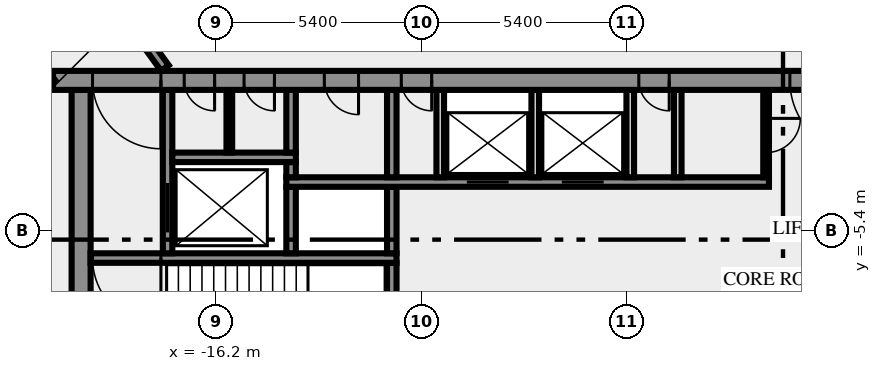
"""IFC4 building model, lengths in metres.
Left out: names, types, materials, properties, quantities, classifications, styles, units other than length and angle.
Written with IfcOpenShell. Run it as: python <this file> out.ifc"""

import sys

from ifc_helpers import new_model, si_unit, direction, frame, frame_2d, origin, place, context, subcontext, project, spatial, rectangle, extrude, element, fill, save


model = new_model("IFC4")
c1 = context("Model", 3, precision=1e-05, world=origin(), true_north=direction((0.0, 1.0)))
c2 = subcontext(c1, "Body", "Model", "MODEL_VIEW")
j1 = project(units=[si_unit("LENGTHUNIT", "METRE"), si_unit("PLANEANGLEUNIT", "RADIAN")], contexts=[c1])
p1 = place(None, origin())
s1 = spatial("IfcSite", under=j1, at=p1, CompositionType="ELEMENT")
p2 = place(p1, origin())
s2 = spatial("IfcBuilding", under=s1, at=p2, CompositionType="ELEMENT")
p3 = place(p2, frame((0.0, 0.0, 269.0)))
s3 = spatial("IfcBuildingStorey", under=s2, at=p3, CompositionType="ELEMENT", Elevation=269.0)
p4 = place(p3, frame((-19.75, -10.5, 0.0), z_axis=(0.0, 0.0, 1.0), x_axis=(0.0, 1.0, 0.0)))
e1 = element("IfcWall", 1, at=p4, inside=s3, PredefinedType="SHEAR", context=c2, shape_type="SweptSolid", body=[
    extrude(rectangle(XDim=8.8, YDim=0.5, at=frame_2d((4.4, 0.0))), origin(), (0.0, 0.0, 1.0), 3.5),
])
p5 = place(p3, frame((-11.575, -7.25, 0.0), z_axis=(0.0, 0.0, 1.0), x_axis=(0.0, 1.0, 0.0)))
e2 = element("IfcWall", 2, at=p5, inside=s3, PredefinedType="SHEAR", context=c2, shape_type="SweptSolid", body=[
    extrude(rectangle(XDim=1.0, YDim=0.25, at=frame_2d((0.5, 0.0))), origin(), (0.0, 0.0, 1.0), 3.5),
])
p6 = place(p3, frame((-11.45, -6.125, 0.0), z_axis=(0.0, 0.0, 1.0), x_axis=(-1.0, 0.0, 0.0)))
e3 = element("IfcWall", 3, at=p6, inside=s3, PredefinedType="SHEAR", context=c2, shape_type="SweptSolid", body=[
    extrude(rectangle(XDim=8.05, YDim=0.25, at=frame_2d((4.025, 0.0))), origin(), (0.0, 0.0, 1.0), 3.5),
])
p7 = place(p6, frame((6.2, 0.0, 0.0)))
e4 = element("IfcOpeningElement", 4, at=p7, cuts=e3, PredefinedType="OPENING", context=c2, shape_type="SweptSolid", body=[
    extrude(rectangle(XDim=1.8, YDim=2.1, at=frame_2d((0.9, 1.05))), frame((0.0, 0.135, 0.0), z_axis=(0.0, -1.0, 0.0), x_axis=(1.0, 0.0, 0.0)), (0.0, 0.0, 1.0), 0.27),
])
p8 = place(p3, frame((-17.475, -6.0, 0.0), z_axis=(0.0, 0.0, 1.0), x_axis=(0.0, 1.0, 0.0)))
e5 = element("IfcWall", 5, at=p8, inside=s3, PredefinedType="SHEAR", context=c2, shape_type="SweptSolid", body=[
    extrude(rectangle(XDim=4.3, YDim=0.25, at=frame_2d((2.15, 0.0))), origin(), (0.0, 0.0, 1.0), 3.5),
])
p9 = place(p8, frame((0.55, 0.0, 0.0)))
e6 = element("IfcOpeningElement", 6, at=p9, cuts=e5, PredefinedType="OPENING", context=c2, shape_type="SweptSolid", body=[
    extrude(rectangle(XDim=1.3, YDim=2.1, at=frame_2d((0.65, 1.05))), frame((0.0, 0.135, 0.0), z_axis=(0.0, -1.0, 0.0), x_axis=(1.0, 0.0, 0.0)), (0.0, 0.0, 1.0), 0.27),
])
for number, where, z_axis, x_axis in (
    (7, (-14.225, -6.0, 0.0), (0.0, 0.0, 1.0), (0.0, 1.0, 0.0)),
    (8, (-11.575, -6.0, 0.0), (0.0, 0.0, 1.0), (0.0, 1.0, 0.0)),
):
    element("IfcWall", number, at=place(p3, frame(where, z_axis=z_axis, x_axis=x_axis)), inside=s3, PredefinedType="SHEAR", context=c2, shape_type="SweptSolid", body=[
        extrude(rectangle(XDim=1.75, YDim=0.25, at=frame_2d((0.875, 0.0))), origin(), (0.0, 0.0, 1.0), 3.5),
    ])
p10 = place(p3, frame((-14.35, -4.125, 0.0), z_axis=(0.0, 0.0, 1.0), x_axis=(1.0, 0.0, 0.0)))
e9 = element("IfcWall", 9, at=p10, inside=s3, PredefinedType="SHEAR", context=c2, shape_type="SweptSolid", body=[
    extrude(rectangle(XDim=12.7, YDim=0.25, at=frame_2d((6.35, 0.0))), origin(), (0.0, 0.0, 1.0), 3.5),
])
p11 = place(p10, frame((4.75, 0.0, 0.0)))
e10 = element("IfcOpeningElement", 10, at=p11, cuts=e9, PredefinedType="OPENING", context=c2, shape_type="SweptSolid", body=[
    extrude(rectangle(XDim=1.1, YDim=2.1, at=frame_2d((0.55, 1.05))), frame((0.0, 0.135, 0.0), z_axis=(0.0, -1.0, 0.0), x_axis=(1.0, 0.0, 0.0)), (0.0, 0.0, 1.0), 0.27),
])
p12 = place(p10, frame((7.25, 0.0, 0.0)))
e11 = element("IfcOpeningElement", 11, at=p12, cuts=e9, PredefinedType="OPENING", context=c2, shape_type="SweptSolid", body=[
    extrude(rectangle(XDim=1.1, YDim=2.1, at=frame_2d((0.55, 1.05))), frame((0.0, 0.135, 0.0), z_axis=(0.0, -1.0, 0.0), x_axis=(1.0, 0.0, 0.0)), (0.0, 0.0, 1.0), 0.27),
])
p13 = place(p3, frame((-14.225, -4.0, 0.0), z_axis=(0.0, 0.0, 1.0), x_axis=(0.0, 1.0, 0.0)))
e12 = element("IfcWall", 12, at=p13, inside=s3, PredefinedType="SHEAR", context=c2, shape_type="SweptSolid", body=[
    extrude(rectangle(XDim=0.4, YDim=0.25, at=frame_2d((0.2, 0.0))), origin(), (0.0, 0.0, 1.0), 3.5),
])
p14 = place(p3, frame((-11.575, -4.0, 0.0), z_axis=(0.0, 0.0, 1.0), x_axis=(0.0, 1.0, 0.0)))
e13 = element("IfcWall", 13, at=p14, inside=s3, PredefinedType="SHEAR", context=c2, shape_type="SweptSolid", body=[
    extrude(rectangle(XDim=2.3, YDim=0.25, at=frame_2d((1.15, 0.0))), origin(), (0.0, 0.0, 1.0), 3.5),
])
for number, where, z_axis, x_axis in (
    (14, (-10.3, -4.0, 0.0), (0.0, 0.0, 1.0), (0.0, 1.0, 0.0)),
    (15, (-7.8, -4.0, 0.0), (0.0, 0.0, 1.0), (0.0, 1.0, 0.0)),
    (16, (-5.3, -4.0, 0.0), (0.0, 0.0, 1.0), (0.0, 1.0, 0.0)),
    (17, (-4.05, -4.0, 0.0), (0.0, 0.0, 1.0), (0.0, 1.0, 0.0)),
):
    element("IfcWall", number, at=place(p3, frame(where, z_axis=z_axis, x_axis=x_axis)), inside=s3, PredefinedType="SOLIDWALL", context=c2, shape_type="SweptSolid", body=[
        extrude(rectangle(XDim=2.3, YDim=0.2, at=frame_2d((1.15, 0.0))), origin(), (0.0, 0.0, 1.0), 3.5),
    ])
p15 = place(p3, frame((-1.725, -1.7, 0.0), z_axis=(0.0, 0.0, 1.0), x_axis=(0.0, -1.0, 0.0)))
e18 = element("IfcWall", 18, at=p15, inside=s3, PredefinedType="PARTITIONING", context=c2, shape_type="SweptSolid", body=[
    extrude(rectangle(XDim=2.3, YDim=0.15, at=frame_2d((1.15, 0.0))), origin(), (0.0, 0.0, 1.0), 3.5),
])
p16 = place(p15, frame((0.75, 0.0, 0.0)))
e19 = element("IfcOpeningElement", 19, at=p16, cuts=e18, PredefinedType="OPENING", context=c2, shape_type="SweptSolid", body=[
    extrude(rectangle(XDim=0.9, YDim=2.1, at=frame_2d((0.45, 1.05))), frame((0.0, 0.085, 0.0), z_axis=(0.0, -1.0, 0.0), x_axis=(1.0, 0.0, 0.0)), (0.0, 0.0, 1.0), 0.17),
])
p17 = place(p3, frame((-17.35, -3.475, 0.0), z_axis=(0.0, 0.0, 1.0), x_axis=(1.0, 0.0, 0.0)))
e20 = element("IfcWall", 20, at=p17, inside=s3, PredefinedType="SHEAR", context=c2, shape_type="SweptSolid", body=[
    extrude(rectangle(XDim=3.25, YDim=0.25, at=frame_2d((1.625, 0.0))), origin(), (0.0, 0.0, 1.0), 3.5),
])
p18 = place(p3, frame((-15.85, -3.35, 0.0), z_axis=(0.0, 0.0, 1.0), x_axis=(0.0, 1.0, 0.0)))
e21 = element("IfcWall", 21, at=p18, inside=s3, PredefinedType="PARTITIONING", context=c2, shape_type="SweptSolid", body=[
    extrude(rectangle(XDim=1.65, YDim=0.15, at=frame_2d((0.825, 0.0))), origin(), (0.0, 0.0, 1.0), 3.5),
])
p19 = place(p3, frame((-14.225, -3.35, 0.0), z_axis=(0.0, 0.0, 1.0), x_axis=(0.0, 1.0, 0.0)))
e22 = element("IfcWall", 22, at=p19, inside=s3, PredefinedType="SHEAR", context=c2, shape_type="SweptSolid", body=[
    extrude(rectangle(XDim=1.65, YDim=0.25, at=frame_2d((0.825, 0.0))), origin(), (0.0, 0.0, 1.0), 3.5),
])
p20 = place(p3, frame((20.49, -1.45, 0.0), z_axis=(0.0, 0.0, 1.0), x_axis=(-1.0, 0.0, 0.0)))
e23 = element("IfcWall", 23, at=p20, inside=s3, PredefinedType="SHEAR", context=c2, shape_type="SweptSolid", body=[
    extrude(rectangle(XDim=40.98, YDim=0.5, at=frame_2d((20.49, 0.0))), origin(), (0.0, 0.0, 1.0), 3.5),
])
p21 = place(p20, frame((38.14, 0.0, 0.0)))
e24 = element("IfcOpeningElement", 24, at=p21, cuts=e23, PredefinedType="OPENING", context=c2, shape_type="SweptSolid", body=[
    extrude(rectangle(XDim=1.8, YDim=2.1, at=frame_2d((0.9, 1.05))), frame((0.0, 0.26, 0.0), z_axis=(0.0, -1.0, 0.0), x_axis=(1.0, 0.0, 0.0)), (0.0, 0.0, 1.0), 0.52),
])
p22 = place(p20, frame((36.728, 0.0, 0.0)))
e25 = element("IfcOpeningElement", 25, at=p22, cuts=e23, PredefinedType="OPENING", context=c2, shape_type="SweptSolid", body=[
    extrude(rectangle(XDim=0.8, YDim=2.1, at=frame_2d((0.4, 1.05))), frame((0.0, 0.26, 0.0), z_axis=(0.0, -1.0, 0.0), x_axis=(1.0, 0.0, 0.0)), (0.0, 0.0, 1.0), 0.52),
])
p23 = place(p20, frame((35.153, 0.0, 0.0)))
e26 = element("IfcOpeningElement", 26, at=p23, cuts=e23, PredefinedType="OPENING", context=c2, shape_type="SweptSolid", body=[
    extrude(rectangle(XDim=0.8, YDim=2.1, at=frame_2d((0.4, 1.05))), frame((0.0, 0.26, 0.0), z_axis=(0.0, -1.0, 0.0), x_axis=(1.0, 0.0, 0.0)), (0.0, 0.0, 1.0), 0.52),
])
p24 = place(p20, frame((32.94, 0.0, 0.0)))
e27 = element("IfcOpeningElement", 27, at=p24, cuts=e23, PredefinedType="OPENING", context=c2, shape_type="SweptSolid", body=[
    extrude(rectangle(XDim=0.9, YDim=2.1, at=frame_2d((0.45, 1.05))), frame((0.0, 0.26, 0.0), z_axis=(0.0, -1.0, 0.0), x_axis=(1.0, 0.0, 0.0)), (0.0, 0.0, 1.0), 0.52),
])
p25 = place(p20, frame((31.015, 0.0, 0.0)))
e28 = element("IfcOpeningElement", 28, at=p25, cuts=e23, PredefinedType="OPENING", context=c2, shape_type="SweptSolid", body=[
    extrude(rectangle(XDim=0.8, YDim=2.1, at=frame_2d((0.4, 1.05))), frame((0.0, 0.26, 0.0), z_axis=(0.0, -1.0, 0.0), x_axis=(1.0, 0.0, 0.0)), (0.0, 0.0, 1.0), 0.52),
])
p26 = place(p20, frame((24.765, 0.0, 0.0)))
e29 = element("IfcOpeningElement", 29, at=p26, cuts=e23, PredefinedType="OPENING", context=c2, shape_type="SweptSolid", body=[
    extrude(rectangle(XDim=0.8, YDim=2.1, at=frame_2d((0.4, 1.05))), frame((0.0, 0.26, 0.0), z_axis=(0.0, -1.0, 0.0), x_axis=(1.0, 0.0, 0.0)), (0.0, 0.0, 1.0), 0.52),
])
p27 = place(p20, frame((19.59, 0.0, 0.0)))
e30 = element("IfcOpeningElement", 30, at=p27, cuts=e23, PredefinedType="OPENING", context=c2, shape_type="SweptSolid", body=[
    extrude(rectangle(XDim=2.0, YDim=2.1, at=frame_2d((1.0, 1.05))), frame((0.0, 0.26, 0.0), z_axis=(0.0, -1.0, 0.0), x_axis=(1.0, 0.0, 0.0)), (0.0, 0.0, 1.0), 0.52),
])
p28 = place(p20, frame((13.202, 0.0, 0.0)))
e31 = element("IfcOpeningElement", 31, at=p28, cuts=e23, PredefinedType="OPENING", context=c2, shape_type="SweptSolid", body=[
    extrude(rectangle(XDim=0.9, YDim=2.1, at=frame_2d((0.45, 1.05))), frame((0.0, 0.26, 0.0), z_axis=(0.0, -1.0, 0.0), x_axis=(1.0, 0.0, 0.0)), (0.0, 0.0, 1.0), 0.52),
])
p29 = place(p20, frame((9.478, 0.0, 0.0)))
e32 = element("IfcOpeningElement", 32, at=p29, cuts=e23, PredefinedType="OPENING", context=c2, shape_type="SweptSolid", body=[
    extrude(rectangle(XDim=0.9, YDim=2.1, at=frame_2d((0.45, 1.05))), frame((0.0, 0.26, 0.0), z_axis=(0.0, -1.0, 0.0), x_axis=(1.0, 0.0, 0.0)), (0.0, 0.0, 1.0), 0.52),
])
p30 = place(p20, frame((7.14, 0.0, 0.0)))
e33 = element("IfcOpeningElement", 33, at=p30, cuts=e23, PredefinedType="OPENING", context=c2, shape_type="SweptSolid", body=[
    extrude(rectangle(XDim=0.9, YDim=2.1, at=frame_2d((0.45, 1.05))), frame((0.0, 0.26, 0.0), z_axis=(0.0, -1.0, 0.0), x_axis=(1.0, 0.0, 0.0)), (0.0, 0.0, 1.0), 0.52),
])
p31 = place(p20, frame((4.19, 0.0, 0.0)))
e34 = element("IfcOpeningElement", 34, at=p31, cuts=e23, PredefinedType="OPENING", context=c2, shape_type="SweptSolid", body=[
    extrude(rectangle(XDim=0.9, YDim=2.1, at=frame_2d((0.45, 1.05))), frame((0.0, 0.26, 0.0), z_axis=(0.0, -1.0, 0.0), x_axis=(1.0, 0.0, 0.0)), (0.0, 0.0, 1.0), 0.52),
])
p32 = place(p20, frame((1.04, 0.0, 0.0)))
e35 = element("IfcOpeningElement", 35, at=p32, cuts=e23, PredefinedType="OPENING", context=c2, shape_type="SweptSolid", body=[
    extrude(rectangle(XDim=1.8, YDim=2.1, at=frame_2d((0.9, 1.05))), frame((0.0, 0.26, 0.0), z_axis=(0.0, -1.0, 0.0), x_axis=(1.0, 0.0, 0.0)), (0.0, 0.0, 1.0), 0.52),
])
p33 = place(p3, frame((-20.531, -1.523, 0.0), z_axis=(0.0, 0.0, 1.0), x_axis=(-0.587786711753, 0.809015934013, 0.0)))
e36 = element("IfcWall", 36, at=p33, inside=s3, PredefinedType="SOLIDWALL", context=c2, shape_type="SweptSolid", body=[
    extrude(rectangle(XDim=21.911, YDim=0.25, at=frame_2d((10.956, 0.0))), origin(), (0.0, 0.0, 1.0), 3.5),
])
p34 = place(p33, frame((0.533, 0.0, 0.0)))
e37 = element("IfcOpeningElement", 37, at=p34, cuts=e36, PredefinedType="OPENING", context=c2, shape_type="SweptSolid", body=[
    extrude(rectangle(XDim=0.9, YDim=2.1, at=frame_2d((0.45, 1.05))), frame((0.0, 0.135, 0.0), z_axis=(0.0, -1.0, 0.0), x_axis=(1.0, 0.0, 0.0)), (0.0, 0.0, 1.0), 0.27),
])
p35 = place(p33, frame((7.816, 0.0, 0.0)))
e38 = element("IfcOpeningElement", 38, at=p35, cuts=e36, PredefinedType="OPENING", context=c2, shape_type="SweptSolid", body=[
    extrude(rectangle(XDim=0.9, YDim=2.1, at=frame_2d((0.45, 1.05))), frame((0.0, 0.135, 0.0), z_axis=(0.0, -1.0, 0.0), x_axis=(1.0, 0.0, 0.0)), (0.0, 0.0, 1.0), 0.27),
])
p36 = place(p3, frame((-31.267, 17.762, 0.0), z_axis=(0.0, 0.0, 1.0), x_axis=(0.587787966774, -0.809015022181, 0.0)))
e39 = element("IfcWall", 39, at=p36, inside=s3, PredefinedType="SOLIDWALL", context=c2, shape_type="SweptSolid", body=[
    extrude(rectangle(XDim=23.345, YDim=0.25, at=frame_2d((11.672, 0.0))), origin(), (0.0, 0.0, 1.0), 3.5),
])
p37 = place(p36, frame((19.004, 0.0, 0.0)))
e40 = element("IfcOpeningElement", 40, at=p37, cuts=e39, PredefinedType="OPENING", context=c2, shape_type="SweptSolid", body=[
    extrude(rectangle(XDim=0.9, YDim=2.1, at=frame_2d((0.45, 1.05))), frame((0.0, 0.135, 0.0), z_axis=(0.0, -1.0, 0.0), x_axis=(1.0, 0.0, 0.0)), (0.0, 0.0, 1.0), 0.27),
])
p38 = place(p7, origin())
e41 = element("IfcDoor", 41, at=p38, inside=s3, OperationType="DOUBLE_DOOR_SINGLE_SWING", PredefinedType="DOOR", context=c2, shape_type="SweptSolid", body=[
    extrude(rectangle(XDim=1.8, YDim=2.1, at=frame_2d((0.9, 1.05))), frame((0.0, 0.025, 0.0), z_axis=(0.0, -1.0, 0.0), x_axis=(1.0, 0.0, 0.0)), (0.0, 0.0, 1.0), 0.05),
])
fill(e4, e41)
p39 = place(p9, origin())
e42 = element("IfcDoor", 42, at=p39, inside=s3, OperationType="DOUBLE_DOOR_SLIDING", PredefinedType="DOOR", context=c2, shape_type="SweptSolid", body=[
    extrude(rectangle(XDim=1.3, YDim=2.1, at=frame_2d((0.65, 1.05))), frame((0.0, 0.025, 0.0), z_axis=(0.0, -1.0, 0.0), x_axis=(1.0, 0.0, 0.0)), (0.0, 0.0, 1.0), 0.05),
])
fill(e6, e42)
p40 = place(p11, origin())
e43 = element("IfcDoor", 43, at=p40, inside=s3, OperationType="DOUBLE_DOOR_SLIDING", PredefinedType="DOOR", context=c2, shape_type="SweptSolid", body=[
    extrude(rectangle(XDim=1.1, YDim=2.1, at=frame_2d((0.55, 1.05))), frame((0.0, 0.025, 0.0), z_axis=(0.0, -1.0, 0.0), x_axis=(1.0, 0.0, 0.0)), (0.0, 0.0, 1.0), 0.05),
])
fill(e10, e43)
p41 = place(p12, origin())
e44 = element("IfcDoor", 44, at=p41, inside=s3, OperationType="DOUBLE_DOOR_SLIDING", PredefinedType="DOOR", context=c2, shape_type="SweptSolid", body=[
    extrude(rectangle(XDim=1.1, YDim=2.1, at=frame_2d((0.55, 1.05))), frame((0.0, 0.025, 0.0), z_axis=(0.0, -1.0, 0.0), x_axis=(1.0, 0.0, 0.0)), (0.0, 0.0, 1.0), 0.05),
])
fill(e11, e44)
p42 = place(p16, origin())
e45 = element("IfcDoor", 45, at=p42, inside=s3, OperationType="SINGLE_SWING_RIGHT", PredefinedType="DOOR", context=c2, shape_type="SweptSolid", body=[
    extrude(rectangle(XDim=0.9, YDim=2.1, at=frame_2d((0.45, 1.05))), frame((0.0, 0.025, 0.0), z_axis=(0.0, -1.0, 0.0), x_axis=(1.0, 0.0, 0.0)), (0.0, 0.0, 1.0), 0.05),
])
fill(e19, e45)
p43 = place(p21, origin())
e46 = element("IfcDoor", 46, at=p43, inside=s3, OperationType="DOUBLE_DOOR_SINGLE_SWING", PredefinedType="DOOR", context=c2, shape_type="SweptSolid", body=[
    extrude(rectangle(XDim=1.8, YDim=2.1, at=frame_2d((0.9, 1.05))), frame((0.0, 0.025, 0.0), z_axis=(0.0, -1.0, 0.0), x_axis=(1.0, 0.0, 0.0)), (0.0, 0.0, 1.0), 0.05),
])
fill(e24, e46)
p44 = place(p22, origin())
e47 = element("IfcDoor", 47, at=p44, inside=s3, OperationType="SINGLE_SWING_RIGHT", PredefinedType="DOOR", context=c2, shape_type="SweptSolid", body=[
    extrude(rectangle(XDim=0.8, YDim=2.1, at=frame_2d((0.4, 1.05))), frame((0.0, 0.025, 0.0), z_axis=(0.0, -1.0, 0.0), x_axis=(1.0, 0.0, 0.0)), (0.0, 0.0, 1.0), 0.05),
])
fill(e25, e47)
p45 = place(p23, origin())
e48 = element("IfcDoor", 48, at=p45, inside=s3, OperationType="SINGLE_SWING_RIGHT", PredefinedType="DOOR", context=c2, shape_type="SweptSolid", body=[
    extrude(rectangle(XDim=0.8, YDim=2.1, at=frame_2d((0.4, 1.05))), frame((0.0, 0.025, 0.0), z_axis=(0.0, -1.0, 0.0), x_axis=(1.0, 0.0, 0.0)), (0.0, 0.0, 1.0), 0.05),
])
fill(e26, e48)
p46 = place(p24, origin())
e49 = element("IfcDoor", 49, at=p46, inside=s3, OperationType="SINGLE_SWING_RIGHT", PredefinedType="DOOR", context=c2, shape_type="SweptSolid", body=[
    extrude(rectangle(XDim=0.9, YDim=2.1, at=frame_2d((0.45, 1.05))), frame((0.0, 0.025, 0.0), z_axis=(0.0, -1.0, 0.0), x_axis=(1.0, 0.0, 0.0)), (0.0, 0.0, 1.0), 0.05),
])
fill(e27, e49)
p47 = place(p25, origin())
e50 = element("IfcDoor", 50, at=p47, inside=s3, OperationType="SINGLE_SWING_RIGHT", PredefinedType="DOOR", context=c2, shape_type="SweptSolid", body=[
    extrude(rectangle(XDim=0.8, YDim=2.1, at=frame_2d((0.4, 1.05))), frame((0.0, 0.025, 0.0), z_axis=(0.0, -1.0, 0.0), x_axis=(1.0, 0.0, 0.0)), (0.0, 0.0, 1.0), 0.05),
])
fill(e28, e50)
p48 = place(p26, origin())
e51 = element("IfcDoor", 51, at=p48, inside=s3, OperationType="SINGLE_SWING_RIGHT", PredefinedType="DOOR", context=c2, shape_type="SweptSolid", body=[
    extrude(rectangle(XDim=0.8, YDim=2.1, at=frame_2d((0.4, 1.05))), frame((0.0, 0.025, 0.0), z_axis=(0.0, -1.0, 0.0), x_axis=(1.0, 0.0, 0.0)), (0.0, 0.0, 1.0), 0.05),
])
fill(e29, e51)
p49 = place(p27, origin())
e52 = element("IfcDoor", 52, at=p49, inside=s3, OperationType="DOUBLE_DOOR_SINGLE_SWING", PredefinedType="DOOR", context=c2, shape_type="SweptSolid", body=[
    extrude(rectangle(XDim=2.0, YDim=2.1, at=frame_2d((1.0, 1.05))), frame((0.0, 0.025, 0.0), z_axis=(0.0, -1.0, 0.0), x_axis=(1.0, 0.0, 0.0)), (0.0, 0.0, 1.0), 0.05),
])
fill(e30, e52)
save(model, sys.argv[1])
